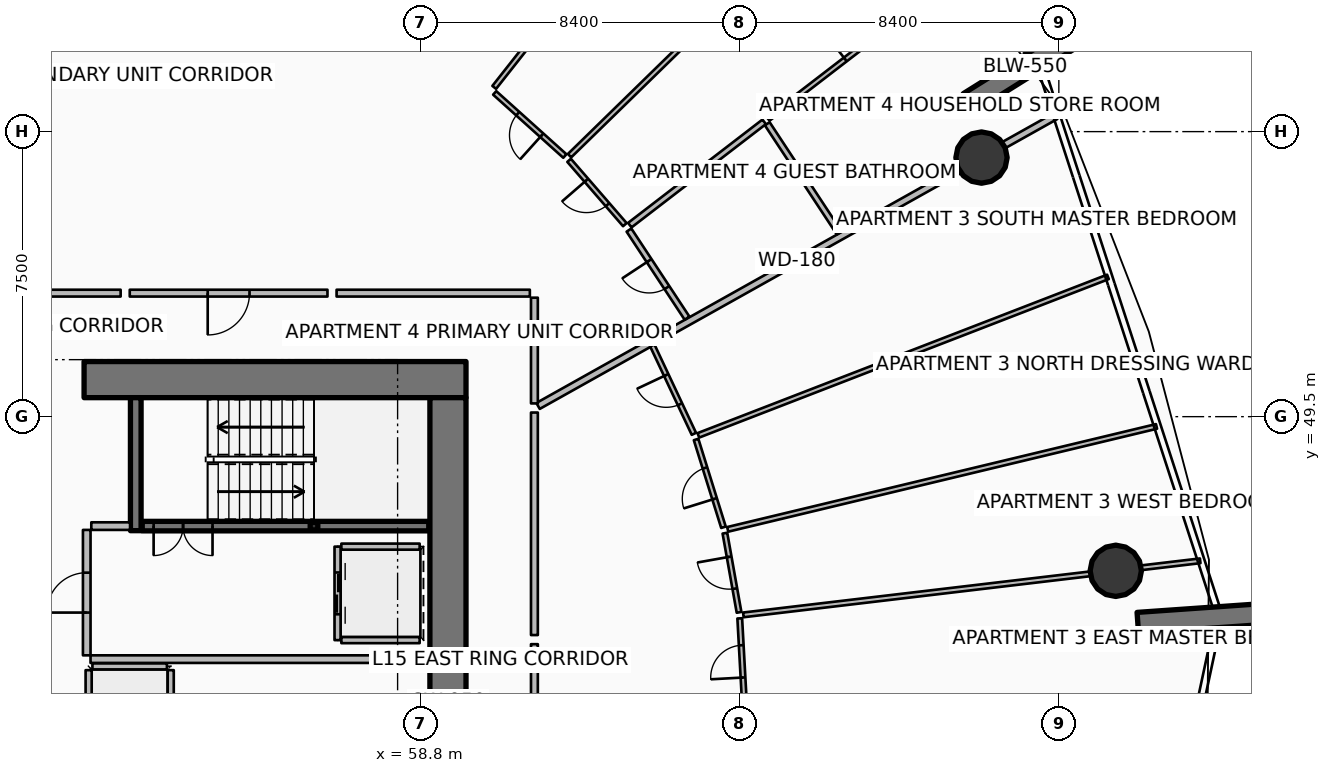
"""IFC4 building model, lengths in metres.
Left out: names, types, materials, properties, quantities, classifications, styles, units other than length and angle.
Written with IfcOpenShell. Run it as: python <this file> out.ifc"""

import sys

from ifc_helpers import new_model, si_unit, direction, frame, frame_2d, origin, origin_2d, place, context, subcontext, project, spatial, rectangle, hollow_rectangle, circle, extrude, element, fill, save


model = new_model("IFC4")
c1 = context("Model", 3, precision=1e-05, world=origin(), true_north=direction((0.0, 1.0)))
c2 = subcontext(c1, "Body", "Model", "MODEL_VIEW")
j1 = project(units=[si_unit("LENGTHUNIT", "METRE"), si_unit("PLANEANGLEUNIT", "RADIAN")], contexts=[c1])
p1 = place(None, origin())
s1 = spatial("IfcSite", under=j1, at=p1, CompositionType="ELEMENT")
p2 = place(p1, origin())
s2 = spatial("IfcBuilding", under=s1, at=p2, CompositionType="ELEMENT")
p3 = place(p2, frame((0.0, 0.0, 63.9)))
s3 = spatial("IfcBuildingStorey", under=s2, at=p3, CompositionType="ELEMENT", Elevation=63.9)
p4 = place(p3, frame((49.95, 50.475, 0.0), z_axis=(0.0, 0.0, 1.0), x_axis=(1.0, 0.0, 0.0)))
e1 = element("IfcWall", 1, at=p4, inside=s3, PredefinedType="SHEAR", context=c2, shape_type="SweptSolid", body=[
    extrude(rectangle(XDim=10.05, YDim=0.95, at=frame_2d((5.025, 0.0))), origin(), (0.0, 0.0, 1.0), 3.75),
])
p5 = place(p3, frame((59.525, 34.0, 0.0), z_axis=(0.0, 0.0, 1.0), x_axis=(0.0, 1.0, 0.0)))
e2 = element("IfcWall", 2, at=p5, inside=s3, PredefinedType="SHEAR", context=c2, shape_type="SweptSolid", body=[
    extrude(rectangle(XDim=16.0, YDim=0.95, at=frame_2d((8.0, 0.0))), origin(), (0.0, 0.0, 1.0), 3.75),
])
p6 = place(p3, frame((51.31, 46.5, 0.0), z_axis=(0.0, 0.0, 1.0), x_axis=(0.0, 1.0, 0.0)))
e3 = element("IfcWall", 3, at=p6, inside=s3, PredefinedType="SHEAR", context=c2, shape_type="SweptSolid", body=[
    extrude(rectangle(XDim=3.5, YDim=0.28, at=frame_2d((1.75, 0.0))), origin(), (0.0, 0.0, 1.0), 3.75),
])
p7 = place(p3, frame((56.0, 46.62, 0.0), z_axis=(0.0, 0.0, 1.0), x_axis=(1.0, 0.0, 0.0)))
e4 = element("IfcColumn", 4, at=p7, inside=s3, PredefinedType="COLUMN", context=c2, shape_type="SweptSolid", body=[
    extrude(hollow_rectangle(XDim=0.2, YDim=0.2, WallThickness=0.01, InnerFilletRadius=0.01, OuterFilletRadius=0.02, at=origin_2d()), origin(), (0.0, 0.0, 1.0), 1.67),
])
for number, where, z_axis, x_axis in (
    (5, (73.23, 57.765, 0.0), (0.0, 0.0, 1.0), (0.848, 0.53, 0.0)),
    (6, (77.678, 44.075, 0.0), (0.0, 0.0, 1.0), (0.998, 0.07, 0.0)),
):
    element("IfcWall", number, at=place(p3, frame(where, z_axis=z_axis, x_axis=x_axis)), inside=s3, PredefinedType="SOLIDWALL", context=c2, shape_type="SweptSolid", body=[
        extrude(rectangle(XDim=3.5, YDim=0.55, at=frame_2d((1.75, 0.0))), origin(), (0.0, 0.0, 1.0), 3.75),
    ])
for number, where, z_axis, x_axis in (
    (7, (73.565, 56.317, 0.0), (0.0, 0.0, 1.0), (1.0, 0.0, 0.0)),
    (8, (77.098, 45.444, 0.0), (0.0, 0.0, 1.0), (1.0, 0.0, 0.0)),
):
    element("IfcColumn", number, at=place(p3, frame(where, z_axis=z_axis, x_axis=x_axis)), inside=s3, PredefinedType="COLUMN", context=c2, shape_type="SweptSolid", body=[
        extrude(circle(Radius=0.675, at=origin_2d()), origin(), (0.0, 0.0, 1.0), 3.5),
    ])
p8 = place(p3, frame((51.48, 46.62, 0.0), z_axis=(0.0, 0.0, 1.0), x_axis=(1.0, 0.0, 0.0)))
e9 = element("IfcWall", 9, at=p8, inside=s3, PredefinedType="SOLIDWALL", context=c2, shape_type="SweptSolid", body=[
    extrude(rectangle(XDim=7.54, YDim=0.25, at=frame_2d((3.77, 0.0))), origin(), (0.0, 0.0, 1.0), 3.5),
])
p9 = place(p8, frame((0.3, 0.0, 0.0)))
e10 = element("IfcOpeningElement", 10, at=p9, cuts=e9, PredefinedType="OPENING", context=c2, shape_type="SweptSolid", body=[
    extrude(rectangle(XDim=1.55, YDim=2.15, at=frame_2d((0.775, 1.075))), frame((0.0, 0.135, 0.0), z_axis=(0.0, -1.0, 0.0), x_axis=(1.0, 0.0, 0.0)), (0.0, 0.0, 1.0), 0.27),
])
p10 = place(p3, frame((56.62, 46.08, 0.0), z_axis=(0.0, 0.0, 1.0), x_axis=(0.0, -1.0, 0.0)))
e11 = element("IfcWall", 11, at=p10, inside=s3, PredefinedType="PARTITIONING", context=c2, shape_type="SweptSolid", body=[
    extrude(rectangle(XDim=2.46, YDim=0.16, at=frame_2d((1.23, 0.0))), origin(), (0.0, 0.0, 1.0), 3.5),
])
p11 = place(p10, frame((0.68, 0.0, 0.0)))
e12 = element("IfcOpeningElement", 12, at=p11, cuts=e11, PredefinedType="OPENING", context=c2, shape_type="SweptSolid", body=[
    extrude(rectangle(XDim=1.1, YDim=2.1, at=frame_2d((0.55, 1.05))), frame((0.0, 0.09, 0.0), z_axis=(0.0, -1.0, 0.0), x_axis=(1.0, 0.0, 0.0)), (0.0, 0.0, 1.0), 0.18),
])
for number, where, z_axis, x_axis in (
    (13, (56.72, 46.08, 0.0), (0.0, 0.0, 1.0), (1.0, 0.0, 0.0)),
    (14, (56.72, 43.62, 0.0), (0.0, 0.0, 1.0), (1.0, 0.0, 0.0)),
):
    element("IfcWall", number, at=place(p3, frame(where, z_axis=z_axis, x_axis=x_axis)), inside=s3, PredefinedType="PARTITIONING", context=c2, shape_type="SweptSolid", body=[
        extrude(rectangle(XDim=2.06, YDim=0.16, at=frame_2d((1.03, 0.0))), origin(), (0.0, 0.0, 1.0), 3.5),
    ])
for number, where, z_axis, x_axis in (
    (15, (52.23, 40.67, 0.0), (0.0, 0.0, 1.0), (0.0, 1.0, 0.0)),
    (16, (50.07, 40.67, 0.0), (0.0, 0.0, 1.0), (0.0, 1.0, 0.0)),
):
    element("IfcWall", number, at=place(p3, frame(where, z_axis=z_axis, x_axis=x_axis)), inside=s3, PredefinedType="PARTITIONING", context=c2, shape_type="SweptSolid", body=[
        extrude(rectangle(XDim=2.16, YDim=0.16, at=frame_2d((1.08, 0.0))), origin(), (0.0, 0.0, 1.0), 3.5),
    ])
p12 = place(p3, frame((50.17, 42.93, 0.0), z_axis=(0.0, 0.0, 1.0), x_axis=(1.0, 0.0, 0.0)))
e17 = element("IfcWall", 17, at=p12, inside=s3, PredefinedType="PARTITIONING", context=c2, shape_type="SweptSolid", body=[
    extrude(rectangle(XDim=1.96, YDim=0.16, at=frame_2d((0.98, 0.0))), origin(), (0.0, 0.0, 1.0), 3.5),
])
p13 = place(p3, frame((50.12, 43.12, 0.0), z_axis=(0.0, 0.0, 1.0), x_axis=(1.0, 0.0, 0.0)))
e18 = element("IfcWall", 18, at=p13, inside=s3, PredefinedType="PARTITIONING", context=c2, shape_type="SweptSolid", body=[
    extrude(rectangle(XDim=8.88, YDim=0.2, at=frame_2d((4.44, 0.0))), origin(), (0.0, 0.0, 1.0), 3.5),
])
p14 = place(p3, frame((50.14, 46.62, 0.0), z_axis=(0.0, 0.0, 1.0), x_axis=(1.0, 0.0, 0.0)))
e19 = element("IfcWall", 19, at=p14, inside=s3, PredefinedType="PARTITIONING", context=c2, shape_type="SweptSolid", body=[
    extrude(rectangle(XDim=1.02, YDim=0.2, at=frame_2d((0.51, 0.0))), origin(), (0.0, 0.0, 1.0), 3.5),
])
p15 = place(p3, frame((50.02, 43.22, 0.0), z_axis=(0.0, 0.0, 1.0), x_axis=(0.0, 1.0, 0.0)))
e20 = element("IfcWall", 20, at=p15, inside=s3, PredefinedType="PARTITIONING", context=c2, shape_type="SweptSolid", body=[
    extrude(rectangle(XDim=3.3, YDim=0.2, at=frame_2d((1.65, 0.0))), origin(), (0.0, 0.0, 1.0), 3.5),
])
p16 = place(p15, frame((1.125, 0.0, 0.0)))
e21 = element("IfcOpeningElement", 21, at=p16, cuts=e20, PredefinedType="OPENING", context=c2, shape_type="SweptSolid", body=[
    extrude(rectangle(XDim=1.05, YDim=2.1, at=frame_2d((0.525, 1.05))), frame((0.0, 0.11, 0.0), z_axis=(0.0, -1.0, 0.0), x_axis=(1.0, 0.0, 0.0)), (0.0, 0.0, 1.0), 0.22),
])
p17 = place(p3, frame((61.896, 49.782, 0.0), z_axis=(0.0, 0.0, 1.0), x_axis=(0.872493215695, 0.488626225828, 0.0)))
e22 = element("IfcWall", 22, at=p17, inside=s3, PredefinedType="PARTITIONING", context=c2, shape_type="SweptSolid", body=[
    extrude(rectangle(XDim=15.612, YDim=0.18, at=frame_2d((7.806, 0.0))), origin(), (0.0, 0.0, 1.0), 2.867),
])
p18 = place(p3, frame((61.8, 38.228, 0.0), z_axis=(0.0, 0.0, 1.0), x_axis=(0.0, 1.0, 0.0)))
e23 = element("IfcWall", 23, at=p18, inside=s3, PredefinedType="PARTITIONING", context=c2, shape_type="SweptSolid", body=[
    extrude(rectangle(XDim=5.285, YDim=0.18, at=frame_2d((2.643, 0.0))), origin(), (0.0, 0.0, 1.0), 2.867),
])
p19 = place(p3, frame((67.328, 41.928, 0.0), z_axis=(0.0, 0.0, 1.0), x_axis=(-0.054903584575, 0.998491660657, 0.0)))
e24 = element("IfcWall", 24, at=p19, inside=s3, PredefinedType="PARTITIONING", context=c2, shape_type="SweptSolid", body=[
    extrude(rectangle(XDim=2.268, YDim=0.125, at=frame_2d((1.134, 0.0))), origin(), (0.0, 0.0, 1.0), 2.867),
])
p20 = place(p19, frame((0.709, 0.0, 0.0)))
e25 = element("IfcOpeningElement", 25, at=p20, cuts=e24, PredefinedType="OPENING", context=c2, shape_type="SweptSolid", body=[
    extrude(rectangle(XDim=0.85, YDim=2.06, at=frame_2d((0.425, 1.03))), frame((0.0, 0.073, 0.0), z_axis=(0.0, -1.0, 0.0), x_axis=(1.0, 0.0, 0.0)), (0.0, 0.0, 1.0), 0.145),
])
p21 = place(p3, frame((61.8, 43.753, 0.0), z_axis=(0.0, 0.0, 1.0), x_axis=(0.0, 1.0, 0.0)))
e26 = element("IfcWall", 26, at=p21, inside=s3, PredefinedType="PARTITIONING", context=c2, shape_type="SweptSolid", body=[
    extrude(rectangle(XDim=5.855, YDim=0.18, at=frame_2d((2.927, 0.0))), origin(), (0.0, 0.0, 1.0), 2.867),
])
p22 = place(p3, frame((67.298, 44.284, 0.0), z_axis=(0.0, 0.0, 1.0), x_axis=(0.993068589749, 0.117536275483, 0.0)))
e27 = element("IfcWall", 27, at=p22, inside=s3, PredefinedType="PARTITIONING", context=c2, shape_type="SweptSolid", body=[
    extrude(rectangle(XDim=12.106, YDim=0.125, at=frame_2d((6.053, 0.0))), origin(), (0.0, 0.0, 1.0), 2.867),
])
p23 = place(p3, frame((66.886, 46.534, 0.0), z_axis=(0.0, 0.0, 1.0), x_axis=(0.972368393799, 0.233451722507, 0.0)))
e28 = element("IfcWall", 28, at=p23, inside=s3, PredefinedType="PARTITIONING", context=c2, shape_type="SweptSolid", body=[
    extrude(rectangle(XDim=11.605, YDim=0.125, at=frame_2d((5.802, 0.0))), origin(), (0.0, 0.0, 1.0), 2.94),
])
p24 = place(p3, frame((66.115, 49.008, 0.0), z_axis=(0.0, 0.0, 1.0), x_axis=(0.932641955578, 0.360803246514, 0.0)))
e29 = element("IfcWall", 29, at=p24, inside=s3, PredefinedType="PARTITIONING", context=c2, shape_type="SweptSolid", body=[
    extrude(rectangle(XDim=11.556, YDim=0.125, at=frame_2d((5.778, 0.0))), origin(), (0.0, 0.0, 1.0), 2.94),
])
p25 = place(p3, frame((67.185, 44.351, 0.0), z_axis=(0.0, 0.0, 1.0), x_axis=(-0.175726743029, 0.984438983271, 0.0)))
e30 = element("IfcWall", 30, at=p25, inside=s3, PredefinedType="PARTITIONING", context=c2, shape_type="SweptSolid", body=[
    extrude(rectangle(XDim=2.116, YDim=0.125, at=frame_2d((1.058, 0.0))), origin(), (0.0, 0.0, 1.0), 2.867),
])
p26 = place(p25, frame((0.633, 0.0, 0.0)))
e31 = element("IfcOpeningElement", 31, at=p26, cuts=e30, PredefinedType="OPENING", context=c2, shape_type="SweptSolid", body=[
    extrude(rectangle(XDim=0.85, YDim=2.06, at=frame_2d((0.425, 1.03))), frame((0.0, 0.073, 0.0), z_axis=(0.0, -1.0, 0.0), x_axis=(1.0, 0.0, 0.0)), (0.0, 0.0, 1.0), 0.145),
])
p27 = place(p3, frame((66.775, 46.59, 0.0), z_axis=(0.0, 0.0, 1.0), x_axis=(-0.297792299564, 0.954630685826, 0.0)))
e32 = element("IfcWall", 32, at=p27, inside=s3, PredefinedType="PARTITIONING", context=c2, shape_type="SweptSolid", body=[
    extrude(rectangle(XDim=2.419, YDim=0.125, at=frame_2d((1.21, 0.0))), origin(), (0.0, 0.0, 1.0), 2.94),
])
p28 = place(p27, frame((0.785, 0.0, 0.0)))
e33 = element("IfcOpeningElement", 33, at=p28, cuts=e32, PredefinedType="OPENING", context=c2, shape_type="SweptSolid", body=[
    extrude(rectangle(XDim=0.85, YDim=2.06, at=frame_2d((0.425, 1.03))), frame((0.0, 0.073, 0.0), z_axis=(0.0, -1.0, 0.0), x_axis=(1.0, 0.0, 0.0)), (0.0, 0.0, 1.0), 0.145),
])
p29 = place(p3, frame((65.997, 49.048, 0.0), z_axis=(0.0, 0.0, 1.0), x_axis=(-0.425774166793, 0.904829463983, 0.0)))
e34 = element("IfcWall", 34, at=p29, inside=s3, PredefinedType="PARTITIONING", context=c2, shape_type="SweptSolid", body=[
    extrude(rectangle(XDim=2.571, YDim=0.125, at=frame_2d((1.285, 0.0))), origin(), (0.0, 0.0, 1.0), 2.867),
])
p30 = place(p29, frame((0.86, 0.0, 0.0)))
e35 = element("IfcOpeningElement", 35, at=p30, cuts=e34, PredefinedType="OPENING", context=c2, shape_type="SweptSolid", body=[
    extrude(rectangle(XDim=0.85, YDim=2.06, at=frame_2d((0.425, 1.03))), frame((0.0, 0.073, 0.0), z_axis=(0.0, -1.0, 0.0), x_axis=(1.0, 0.0, 0.0)), (0.0, 0.0, 1.0), 0.145),
])
p31 = place(p3, frame((56.354, 52.75, 0.0), z_axis=(0.0, 0.0, 1.0), x_axis=(-1.0, 0.0, 0.0)))
e36 = element("IfcWall", 36, at=p31, inside=s3, PredefinedType="PARTITIONING", context=c2, shape_type="SweptSolid", body=[
    extrude(rectangle(XDim=5.203, YDim=0.18, at=frame_2d((2.601, 0.0))), origin(), (0.0, 0.0, 1.0), 2.867),
])
p32 = place(p31, frame((2.052, 0.0, 0.0)))
e37 = element("IfcOpeningElement", 37, at=p32, cuts=e36, PredefinedType="OPENING", context=c2, shape_type="SweptSolid", body=[
    extrude(rectangle(XDim=1.1, YDim=2.1, at=frame_2d((0.55, 1.05))), frame((0.0, 0.1, 0.0), z_axis=(0.0, -1.0, 0.0), x_axis=(1.0, 0.0, 0.0)), (0.0, 0.0, 1.0), 0.2),
])
p33 = place(p3, frame((61.8, 49.848, 0.0), z_axis=(0.0, 0.0, 1.0), x_axis=(0.0, 1.0, 0.0)))
e38 = element("IfcWall", 38, at=p33, inside=s3, PredefinedType="PARTITIONING", context=c2, shape_type="SweptSolid", body=[
    extrude(rectangle(XDim=2.781, YDim=0.18, at=frame_2d((1.391, 0.0))), origin(), (0.0, 0.0, 1.0), 2.867),
])
p34 = place(p3, frame((61.68, 52.75, 0.0), z_axis=(0.0, 0.0, 1.0), x_axis=(-1.0, 0.0, 0.0)))
e39 = element("IfcWall", 39, at=p34, inside=s3, PredefinedType="PARTITIONING", context=c2, shape_type="SweptSolid", body=[
    extrude(rectangle(XDim=5.085, YDim=0.18, at=frame_2d((2.543, 0.0))), origin(), (0.0, 0.0, 1.0), 2.867),
])
p35 = place(p3, frame((60.743, 58.164, 0.0), z_axis=(0.0, 0.0, 1.0), x_axis=(0.61907620874, 0.785330916093, 0.0)))
e40 = element("IfcWall", 40, at=p35, inside=s3, PredefinedType="PARTITIONING", context=c2, shape_type="SweptSolid", body=[
    extrude(rectangle(XDim=10.091, YDim=0.125, at=frame_2d((5.046, 0.0))), origin(), (0.0, 0.0, 1.0), 2.867),
])
p36 = place(p3, frame((65.816, 52.092, 0.0), z_axis=(0.0, 0.0, 1.0), x_axis=(-0.550532146696, 0.834813964578, 0.0)))
e41 = element("IfcWall", 41, at=p36, inside=s3, PredefinedType="PARTITIONING", context=c2, shape_type="SweptSolid", body=[
    extrude(rectangle(XDim=2.776, YDim=0.15, at=frame_2d((1.388, 0.0))), origin(), (0.0, 0.0, 1.0), 2.867),
])
p37 = place(p36, frame((0.963, 0.0, 0.0)))
e42 = element("IfcOpeningElement", 42, at=p37, cuts=e41, PredefinedType="OPENING", context=c2, shape_type="SweptSolid", body=[
    extrude(rectangle(XDim=0.85, YDim=2.06, at=frame_2d((0.425, 1.03))), frame((0.0, 0.085, 0.0), z_axis=(0.0, -1.0, 0.0), x_axis=(1.0, 0.0, 0.0)), (0.0, 0.0, 1.0), 0.17),
])
p38 = place(p3, frame((69.821, 54.335, 0.0), z_axis=(0.0, 0.0, 1.0), x_axis=(-0.550516877558, 0.834824033868, 0.0)))
e43 = element("IfcWall", 43, at=p38, inside=s3, PredefinedType="PARTITIONING", context=c2, shape_type="SweptSolid", body=[
    extrude(rectangle(XDim=3.44, YDim=0.15, at=frame_2d((1.72, 0.0))), origin(), (0.0, 0.0, 1.0), 2.867),
])
p39 = place(p3, frame((64.31, 54.539, 0.0), z_axis=(0.0, 0.0, 1.0), x_axis=(0.792803030826, 0.609477935871, 0.0)))
e44 = element("IfcWall", 44, at=p39, inside=s3, PredefinedType="PARTITIONING", context=c2, shape_type="SweptSolid", body=[
    extrude(rectangle(XDim=4.46, YDim=0.15, at=frame_2d((2.23, 0.0))), origin(), (0.0, 0.0, 1.0), 2.94),
])
p40 = place(p3, frame((67.949, 57.337, 0.0), z_axis=(0.0, 0.0, 1.0), x_axis=(0.792800135679, 0.609481701832, 0.0)))
e45 = element("IfcWall", 45, at=p40, inside=s3, PredefinedType="PARTITIONING", context=c2, shape_type="SweptSolid", body=[
    extrude(rectangle(XDim=5.976, YDim=0.125, at=frame_2d((2.988, 0.0))), origin(), (0.0, 0.0, 1.0), 2.94),
])
p41 = place(p40, frame((2.563, 0.0, 0.0)))
e46 = element("IfcOpeningElement", 46, at=p41, cuts=e45, PredefinedType="OPENING", context=c2, shape_type="SweptSolid", body=[
    extrude(rectangle(XDim=0.85, YDim=2.06, at=frame_2d((0.425, 1.03))), frame((0.0, 0.073, 0.0), z_axis=(0.0, -1.0, 0.0), x_axis=(1.0, 0.0, 0.0)), (0.0, 0.0, 1.0), 0.145),
])
p42 = place(p3, frame((62.725, 56.368, 0.0), z_axis=(0.0, 0.0, 1.0), x_axis=(0.715749552764, 0.698357056038, 0.0)))
e47 = element("IfcWall", 47, at=p42, inside=s3, PredefinedType="PARTITIONING", context=c2, shape_type="SweptSolid", body=[
    extrude(rectangle(XDim=10.107, YDim=0.125, at=frame_2d((5.053, 0.0))), origin(), (0.0, 0.0, 1.0), 2.94),
])
p43 = place(p3, frame((64.18, 54.552, 0.0), z_axis=(0.0, 0.0, 1.0), x_axis=(-0.654947139149, 0.75567469517, 0.0)))
e48 = element("IfcWall", 48, at=p43, inside=s3, PredefinedType="PARTITIONING", context=c2, shape_type="SweptSolid", body=[
    extrude(rectangle(XDim=2.24, YDim=0.125, at=frame_2d((1.12, 0.0))), origin(), (0.0, 0.0, 1.0), 2.94),
])
p44 = place(p43, frame((0.695, 0.0, 0.0)))
e49 = element("IfcOpeningElement", 49, at=p44, cuts=e48, PredefinedType="OPENING", context=c2, shape_type="SweptSolid", body=[
    extrude(rectangle(XDim=0.85, YDim=2.06, at=frame_2d((0.425, 1.03))), frame((0.0, 0.073, 0.0), z_axis=(0.0, -1.0, 0.0), x_axis=(1.0, 0.0, 0.0)), (0.0, 0.0, 1.0), 0.145),
])
p45 = place(p3, frame((62.601, 56.358, 0.0), z_axis=(0.0, 0.0, 1.0), x_axis=(-0.743435913228, 0.66880717918, 0.0)))
e50 = element("IfcWall", 50, at=p45, inside=s3, PredefinedType="PARTITIONING", context=c2, shape_type="SweptSolid", body=[
    extrude(rectangle(XDim=2.483, YDim=0.125, at=frame_2d((1.241, 0.0))), origin(), (0.0, 0.0, 1.0), 2.867),
])
p46 = place(p45, frame((0.816, 0.0, 0.0)))
e51 = element("IfcOpeningElement", 51, at=p46, cuts=e50, PredefinedType="OPENING", context=c2, shape_type="SweptSolid", body=[
    extrude(rectangle(XDim=0.85, YDim=2.06, at=frame_2d((0.425, 1.03))), frame((0.0, 0.073, 0.0), z_axis=(0.0, -1.0, 0.0), x_axis=(1.0, 0.0, 0.0)), (0.0, 0.0, 1.0), 0.145),
])
p47 = place(p3, frame((50.912, 52.75, 0.0), z_axis=(0.0, 0.0, 1.0), x_axis=(-1.0, 0.0, 0.0)))
e52 = element("IfcWall", 52, at=p47, inside=s3, PredefinedType="PARTITIONING", context=c2, shape_type="SweptSolid", body=[
    extrude(rectangle(XDim=4.064, YDim=0.18, at=frame_2d((2.032, 0.0))), origin(), (0.0, 0.0, 1.0), 2.867),
])
p48 = place(p9, origin())
e53 = element("IfcDoor", 53, at=p48, inside=s3, OperationType="DOUBLE_DOOR_SINGLE_SWING", PredefinedType="DOOR", context=c2, shape_type="SweptSolid", body=[
    extrude(rectangle(XDim=1.55, YDim=2.15, at=frame_2d((0.775, 1.075))), frame((0.0, 0.025, 0.0), z_axis=(0.0, -1.0, 0.0), x_axis=(1.0, 0.0, 0.0)), (0.0, 0.0, 1.0), 0.05),
])
fill(e10, e53)
p49 = place(p11, origin())
e54 = element("IfcDoor", 54, at=p49, inside=s3, OperationType="DOUBLE_DOOR_SLIDING", PredefinedType="DOOR", context=c2, shape_type="SweptSolid", body=[
    extrude(rectangle(XDim=1.1, YDim=2.1, at=frame_2d((0.55, 1.05))), frame((0.0, 0.025, 0.0), z_axis=(0.0, -1.0, 0.0), x_axis=(1.0, 0.0, 0.0)), (0.0, 0.0, 1.0), 0.05),
])
fill(e12, e54)
p50 = place(p16, origin())
e55 = element("IfcDoor", 55, at=p50, inside=s3, OperationType="SINGLE_SWING_LEFT", PredefinedType="DOOR", context=c2, shape_type="SweptSolid", body=[
    extrude(rectangle(XDim=1.05, YDim=2.1, at=frame_2d((0.525, 1.05))), frame((0.0, 0.025, 0.0), z_axis=(0.0, -1.0, 0.0), x_axis=(1.0, 0.0, 0.0)), (0.0, 0.0, 1.0), 0.05),
])
fill(e21, e55)
p51 = place(p20, origin())
e56 = element("IfcDoor", 56, at=p51, inside=s3, OperationType="SINGLE_SWING_LEFT", PredefinedType="DOOR", context=c2, shape_type="SweptSolid", body=[
    extrude(rectangle(XDim=0.85, YDim=2.06, at=frame_2d((0.425, 1.03))), frame((0.0, 0.025, 0.0), z_axis=(0.0, -1.0, 0.0), x_axis=(1.0, 0.0, 0.0)), (0.0, 0.0, 1.0), 0.05),
])
fill(e25, e56)
p52 = place(p26, origin())
e57 = element("IfcDoor", 57, at=p52, inside=s3, OperationType="SINGLE_SWING_RIGHT", PredefinedType="DOOR", context=c2, shape_type="SweptSolid", body=[
    extrude(rectangle(XDim=0.85, YDim=2.06, at=frame_2d((0.425, 1.03))), frame((0.0, 0.025, 0.0), z_axis=(0.0, -1.0, 0.0), x_axis=(1.0, 0.0, 0.0)), (0.0, 0.0, 1.0), 0.05),
])
fill(e31, e57)
p53 = place(p28, origin())
e58 = element("IfcDoor", 58, at=p53, inside=s3, OperationType="SINGLE_SWING_LEFT", PredefinedType="DOOR", context=c2, shape_type="SweptSolid", body=[
    extrude(rectangle(XDim=0.85, YDim=2.06, at=frame_2d((0.425, 1.03))), frame((0.0, 0.025, 0.0), z_axis=(0.0, -1.0, 0.0), x_axis=(1.0, 0.0, 0.0)), (0.0, 0.0, 1.0), 0.05),
])
fill(e33, e58)
p54 = place(p30, origin())
e59 = element("IfcDoor", 59, at=p54, inside=s3, OperationType="SINGLE_SWING_RIGHT", PredefinedType="DOOR", context=c2, shape_type="SweptSolid", body=[
    extrude(rectangle(XDim=0.85, YDim=2.06, at=frame_2d((0.425, 1.03))), frame((0.0, 0.025, 0.0), z_axis=(0.0, -1.0, 0.0), x_axis=(1.0, 0.0, 0.0)), (0.0, 0.0, 1.0), 0.05),
])
fill(e35, e59)
p55 = place(p32, origin())
e60 = element("IfcDoor", 60, at=p55, inside=s3, OperationType="SINGLE_SWING_RIGHT", PredefinedType="DOOR", context=c2, shape_type="SweptSolid", body=[
    extrude(rectangle(XDim=1.1, YDim=2.1, at=frame_2d((0.55, 1.05))), frame((0.0, 0.025, 0.0), z_axis=(0.0, -1.0, 0.0), x_axis=(1.0, 0.0, 0.0)), (0.0, 0.0, 1.0), 0.05),
])
fill(e37, e60)
p56 = place(p37, origin())
e61 = element("IfcDoor", 61, at=p56, inside=s3, OperationType="SINGLE_SWING_RIGHT", PredefinedType="DOOR", context=c2, shape_type="SweptSolid", body=[
    extrude(rectangle(XDim=0.85, YDim=2.06, at=frame_2d((0.425, 1.03))), frame((0.0, 0.025, 0.0), z_axis=(0.0, -1.0, 0.0), x_axis=(1.0, 0.0, 0.0)), (0.0, 0.0, 1.0), 0.05),
])
fill(e42, e61)
p57 = place(p41, origin())
e62 = element("IfcDoor", 62, at=p57, inside=s3, OperationType="SINGLE_SWING_LEFT", PredefinedType="DOOR", context=c2, shape_type="SweptSolid", body=[
    extrude(rectangle(XDim=0.85, YDim=2.06, at=frame_2d((0.425, 1.03))), frame((0.0, 0.025, 0.0), z_axis=(0.0, -1.0, 0.0), x_axis=(1.0, 0.0, 0.0)), (0.0, 0.0, 1.0), 0.05),
])
fill(e46, e62)
p58 = place(p44, origin())
e63 = element("IfcDoor", 63, at=p58, inside=s3, OperationType="SINGLE_SWING_RIGHT", PredefinedType="DOOR", context=c2, shape_type="SweptSolid", body=[
    extrude(rectangle(XDim=0.85, YDim=2.06, at=frame_2d((0.425, 1.03))), frame((0.0, 0.025, 0.0), z_axis=(0.0, -1.0, 0.0), x_axis=(1.0, 0.0, 0.0)), (0.0, 0.0, 1.0), 0.05),
])
fill(e49, e63)
p59 = place(p46, origin())
e64 = element("IfcDoor", 64, at=p59, inside=s3, OperationType="SINGLE_SWING_LEFT", PredefinedType="DOOR", context=c2, shape_type="SweptSolid", body=[
    extrude(rectangle(XDim=0.85, YDim=2.06, at=frame_2d((0.425, 1.03))), frame((0.0, 0.025, 0.0), z_axis=(0.0, -1.0, 0.0), x_axis=(1.0, 0.0, 0.0)), (0.0, 0.0, 1.0), 0.05),
])
fill(e51, e64)
save(model, sys.argv[1])
